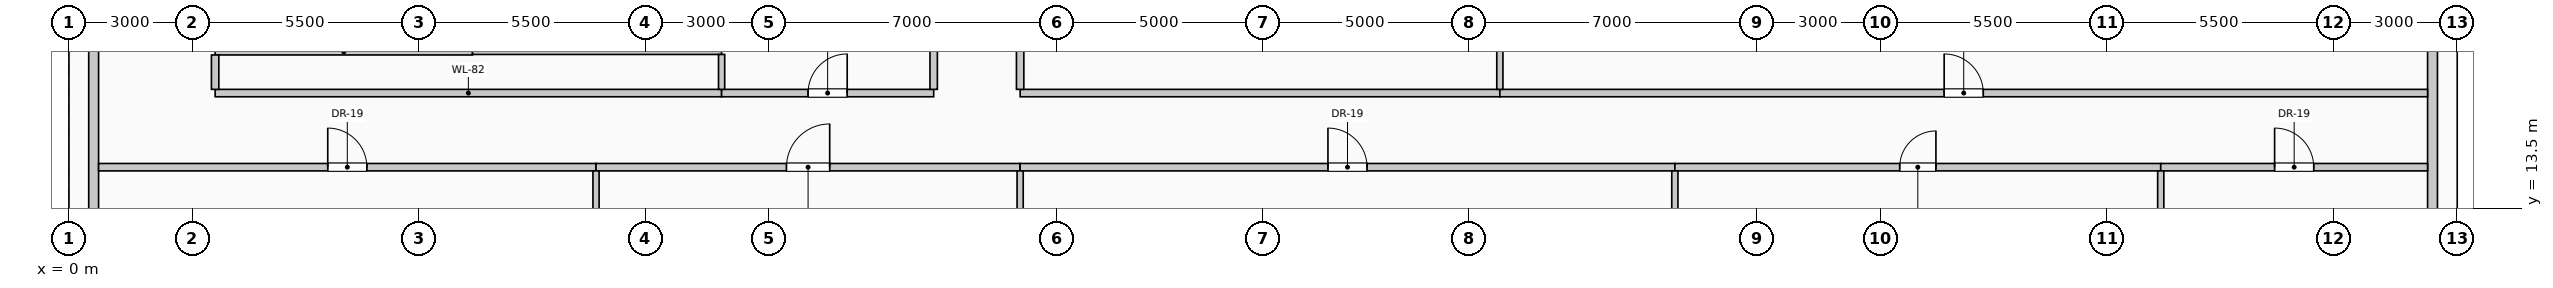
"""IFC4 building model, lengths in metres.
Left out: names, types, materials, properties, quantities, classifications, styles, units other than length and angle.
Written with IfcOpenShell. Run it as: python <this file> out.ifc"""

import sys

from ifc_helpers import new_model, si_unit, direction, frame, frame_2d, origin, place, context, subcontext, project, spatial, rectangle, extrude, element, fill, save


model = new_model("IFC4")
c1 = context("Model", 3, precision=1e-05, world=origin(), true_north=direction((0.0, 1.0)))
c2 = subcontext(c1, "Body", "Model", "MODEL_VIEW")
j1 = project(units=[si_unit("LENGTHUNIT", "METRE"), si_unit("PLANEANGLEUNIT", "RADIAN")], contexts=[c1])
p1 = place(None, origin())
s1 = spatial("IfcSite", under=j1, at=p1, CompositionType="ELEMENT")
p2 = place(p1, origin())
s2 = spatial("IfcBuilding", under=s1, at=p2, CompositionType="ELEMENT")
p3 = place(p2, frame((0.0, 0.0, 214.6)))
s3 = spatial("IfcBuildingStorey", under=s2, at=p3, CompositionType="ELEMENT", Elevation=214.6)
p4 = place(p3, frame((0.6, 10.42, 0.0), z_axis=(0.0, 0.0, 1.0), x_axis=(0.0, 1.0, 0.0)))
e1 = element("IfcWall", 1, at=p4, inside=s3, PredefinedType="SOLIDWALL", context=c2, shape_type="SweptSolid", body=[
    extrude(rectangle(XDim=7.16, YDim=0.24, at=frame_2d((3.58, 0.0))), origin(), (0.0, 0.0, 1.0), 3.0),
])
p5 = place(p4, frame((1.187, 0.0, 0.42)))
e2 = element("IfcOpeningElement", 2, at=p5, cuts=e1, PredefinedType="OPENING", context=c2, shape_type="SweptSolid", body=[
    extrude(rectangle(XDim=1.8, YDim=2.2, at=frame_2d((0.9, 1.1))), frame((0.0, 0.13, 0.0), z_axis=(0.0, -1.0, 0.0), x_axis=(1.0, 0.0, 0.0)), (0.0, 0.0, 1.0), 0.26),
])
p6 = place(p3, frame((57.4, 17.58, 0.0), z_axis=(0.0, 0.0, 1.0), x_axis=(0.0, -1.0, 0.0)))
e3 = element("IfcWall", 3, at=p6, inside=s3, PredefinedType="SOLIDWALL", context=c2, shape_type="SweptSolid", body=[
    extrude(rectangle(XDim=7.16, YDim=0.24, at=frame_2d((3.58, 0.0))), origin(), (0.0, 0.0, 1.0), 3.0),
])
p7 = place(p6, frame((4.173, 0.0, 0.42)))
e4 = element("IfcOpeningElement", 4, at=p7, cuts=e3, PredefinedType="OPENING", context=c2, shape_type="SweptSolid", body=[
    extrude(rectangle(XDim=1.8, YDim=2.2, at=frame_2d((0.9, 1.1))), frame((0.0, 0.13, 0.0), z_axis=(0.0, -1.0, 0.0), x_axis=(1.0, 0.0, 0.0)), (0.0, 0.0, 1.0), 0.26),
])
p8 = place(p3, frame((0.72, 14.5, 0.0), z_axis=(0.0, 0.0, 1.0), x_axis=(1.0, 0.0, 0.0)))
e5 = element("IfcWall", 5, at=p8, inside=s3, PredefinedType="PARTITIONING", context=c2, shape_type="SweptSolid", body=[
    extrude(rectangle(XDim=12.08, YDim=0.18, at=frame_2d((6.04, 0.0))), origin(), (0.0, 0.0, 1.0), 3.75),
])
p9 = place(p8, frame((5.565, 0.0, 0.0)))
e6 = element("IfcOpeningElement", 6, at=p9, cuts=e5, PredefinedType="OPENING", context=c2, shape_type="SweptSolid", body=[
    extrude(rectangle(XDim=0.95, YDim=2.15, at=frame_2d((0.475, 1.075))), frame((0.0, 0.1, 0.0), z_axis=(0.0, -1.0, 0.0), x_axis=(1.0, 0.0, 0.0)), (0.0, 0.0, 1.0), 0.2),
])
p10 = place(p3, frame((12.8, 14.5, 0.0), z_axis=(0.0, 0.0, 1.0), x_axis=(1.0, 0.0, 0.0)))
e7 = element("IfcWall", 7, at=p10, inside=s3, PredefinedType="PARTITIONING", context=c2, shape_type="SweptSolid", body=[
    extrude(rectangle(XDim=10.3, YDim=0.18, at=frame_2d((5.15, 0.0))), origin(), (0.0, 0.0, 1.0), 3.75),
])
p11 = place(p10, frame((4.625, 0.0, 0.0)))
e8 = element("IfcOpeningElement", 8, at=p11, cuts=e7, PredefinedType="OPENING", context=c2, shape_type="SweptSolid", body=[
    extrude(rectangle(XDim=1.05, YDim=2.15, at=frame_2d((0.525, 1.075))), frame((0.0, 0.1, 0.0), z_axis=(0.0, -1.0, 0.0), x_axis=(1.0, 0.0, 0.0)), (0.0, 0.0, 1.0), 0.2),
])
p12 = place(p3, frame((23.1, 14.5, 0.0), z_axis=(0.0, 0.0, 1.0), x_axis=(1.0, 0.0, 0.0)))
e9 = element("IfcWall", 9, at=p12, inside=s3, PredefinedType="PARTITIONING", context=c2, shape_type="SweptSolid", body=[
    extrude(rectangle(XDim=15.9, YDim=0.18, at=frame_2d((7.95, 0.0))), origin(), (0.0, 0.0, 1.0), 3.75),
])
p13 = place(p12, frame((7.475, 0.0, 0.0)))
e10 = element("IfcOpeningElement", 10, at=p13, cuts=e9, PredefinedType="OPENING", context=c2, shape_type="SweptSolid", body=[
    extrude(rectangle(XDim=0.95, YDim=2.15, at=frame_2d((0.475, 1.075))), frame((0.0, 0.1, 0.0), z_axis=(0.0, -1.0, 0.0), x_axis=(1.0, 0.0, 0.0)), (0.0, 0.0, 1.0), 0.2),
])
p14 = place(p3, frame((39.0, 14.5, 0.0), z_axis=(0.0, 0.0, 1.0), x_axis=(1.0, 0.0, 0.0)))
e11 = element("IfcWall", 11, at=p14, inside=s3, PredefinedType="PARTITIONING", context=c2, shape_type="SweptSolid", body=[
    extrude(rectangle(XDim=11.8, YDim=0.18, at=frame_2d((5.9, 0.0))), origin(), (0.0, 0.0, 1.0), 3.75),
])
p15 = place(p14, frame((5.46, 0.0, 0.0)))
e12 = element("IfcOpeningElement", 12, at=p15, cuts=e11, PredefinedType="OPENING", context=c2, shape_type="SweptSolid", body=[
    extrude(rectangle(XDim=0.88, YDim=2.1, at=frame_2d((0.44, 1.05))), frame((0.0, 0.1, 0.0), z_axis=(0.0, -1.0, 0.0), x_axis=(1.0, 0.0, 0.0)), (0.0, 0.0, 1.0), 0.2),
])
p16 = place(p3, frame((50.8, 14.5, 0.0), z_axis=(0.0, 0.0, 1.0), x_axis=(1.0, 0.0, 0.0)))
e13 = element("IfcWall", 13, at=p16, inside=s3, PredefinedType="PARTITIONING", context=c2, shape_type="SweptSolid", body=[
    extrude(rectangle(XDim=6.48, YDim=0.18, at=frame_2d((3.24, 0.0))), origin(), (0.0, 0.0, 1.0), 3.75),
])
p17 = place(p16, frame((2.765, 0.0, 0.0)))
e14 = element("IfcOpeningElement", 14, at=p17, cuts=e13, PredefinedType="OPENING", context=c2, shape_type="SweptSolid", body=[
    extrude(rectangle(XDim=0.95, YDim=2.15, at=frame_2d((0.475, 1.075))), frame((0.0, 0.1, 0.0), z_axis=(0.0, -1.0, 0.0), x_axis=(1.0, 0.0, 0.0)), (0.0, 0.0, 1.0), 0.2),
])
p18 = place(p3, frame((3.55, 16.3, 0.0), z_axis=(0.0, 0.0, 1.0), x_axis=(1.0, 0.0, 0.0)))
e15 = element("IfcWall", 15, at=p18, inside=s3, PredefinedType="PARTITIONING", context=c2, shape_type="SweptSolid", body=[
    extrude(rectangle(XDim=12.3, YDim=0.18, at=frame_2d((6.15, 0.0))), origin(), (0.0, 0.0, 1.0), 3.75),
])
p19 = place(p3, frame((15.85, 16.3, 0.0), z_axis=(0.0, 0.0, 1.0), x_axis=(1.0, 0.0, 0.0)))
e16 = element("IfcWall", 16, at=p19, inside=s3, PredefinedType="PARTITIONING", context=c2, shape_type="SweptSolid", body=[
    extrude(rectangle(XDim=5.15, YDim=0.18, at=frame_2d((2.575, 0.0))), origin(), (0.0, 0.0, 1.0), 3.75),
])
p20 = place(p19, frame((2.1, 0.0, 0.0)))
e17 = element("IfcOpeningElement", 17, at=p20, cuts=e16, PredefinedType="OPENING", context=c2, shape_type="SweptSolid", body=[
    extrude(rectangle(XDim=0.95, YDim=2.15, at=frame_2d((0.475, 1.075))), frame((0.0, 0.1, 0.0), z_axis=(0.0, -1.0, 0.0), x_axis=(1.0, 0.0, 0.0)), (0.0, 0.0, 1.0), 0.2),
])
p21 = place(p3, frame((23.1, 16.3, 0.0), z_axis=(0.0, 0.0, 1.0), x_axis=(1.0, 0.0, 0.0)))
e18 = element("IfcWall", 18, at=p21, inside=s3, PredefinedType="PARTITIONING", context=c2, shape_type="SweptSolid", body=[
    extrude(rectangle(XDim=11.65, YDim=0.18, at=frame_2d((5.825, 0.0))), origin(), (0.0, 0.0, 1.0), 3.75),
])
p22 = place(p3, frame((34.75, 16.3, 0.0), z_axis=(0.0, 0.0, 1.0), x_axis=(1.0, 0.0, 0.0)))
e19 = element("IfcWall", 19, at=p22, inside=s3, PredefinedType="PARTITIONING", context=c2, shape_type="SweptSolid", body=[
    extrude(rectangle(XDim=22.53, YDim=0.18, at=frame_2d((11.265, 0.0))), origin(), (0.0, 0.0, 1.0), 3.75),
])
p23 = place(p22, frame((10.79, 0.0, 0.0)))
e20 = element("IfcOpeningElement", 20, at=p23, cuts=e19, PredefinedType="OPENING", context=c2, shape_type="SweptSolid", body=[
    extrude(rectangle(XDim=0.95, YDim=2.15, at=frame_2d((0.475, 1.075))), frame((0.0, 0.1, 0.0), z_axis=(0.0, -1.0, 0.0), x_axis=(1.0, 0.0, 0.0)), (0.0, 0.0, 1.0), 0.2),
])
p24 = place(p3, frame((3.55, 17.3, 0.0), z_axis=(0.0, 0.0, 1.0), x_axis=(1.0, 0.0, 0.0)))
e21 = element("IfcWall", 21, at=p24, inside=s3, PredefinedType="PARTITIONING", context=c2, shape_type="SweptSolid", body=[
    extrude(rectangle(XDim=6.25, YDim=0.15, at=frame_2d((3.125, 0.0))), origin(), (0.0, 0.0, 1.0), 3.75),
])
p25 = place(p3, frame((9.8, 17.3, 0.0), z_axis=(0.0, 0.0, 1.0), x_axis=(1.0, 0.0, 0.0)))
e22 = element("IfcWall", 22, at=p25, inside=s3, PredefinedType="PARTITIONING", context=c2, shape_type="SweptSolid", body=[
    extrude(rectangle(XDim=6.05, YDim=0.125, at=frame_2d((3.025, 0.0))), origin(), (0.0, 0.0, 1.0), 3.75),
])
p26 = place(p3, frame((3.55, 16.39, 0.0), z_axis=(0.0, 0.0, 1.0), x_axis=(0.0, 1.0, 0.0)))
e23 = element("IfcWall", 23, at=p26, inside=s3, PredefinedType="PARTITIONING", context=c2, shape_type="SweptSolid", body=[
    extrude(rectangle(XDim=0.835, YDim=0.18, at=frame_2d((0.417, 0.0))), origin(), (0.0, 0.0, 1.0), 3.75),
])
p27 = place(p3, frame((12.8, 0.72, 0.0), z_axis=(0.0, 0.0, 1.0), x_axis=(0.0, 1.0, 0.0)))
e24 = element("IfcWall", 24, at=p27, inside=s3, PredefinedType="PARTITIONING", context=c2, shape_type="SweptSolid", body=[
    extrude(rectangle(XDim=13.69, YDim=0.15, at=frame_2d((6.845, 0.0))), origin(), (0.0, 0.0, 1.0), 3.75),
])
p28 = place(p3, frame((15.85, 16.39, 0.0), z_axis=(0.0, 0.0, 1.0), x_axis=(0.0, 1.0, 0.0)))
e25 = element("IfcWall", 25, at=p28, inside=s3, PredefinedType="PARTITIONING", context=c2, shape_type="SweptSolid", body=[
    extrude(rectangle(XDim=0.848, YDim=0.15, at=frame_2d((0.424, 0.0))), origin(), (0.0, 0.0, 1.0), 3.75),
])
p29 = place(p3, frame((21.0, 16.39, 0.0), z_axis=(0.0, 0.0, 1.0), x_axis=(0.0, 1.0, 0.0)))
e26 = element("IfcWall", 26, at=p29, inside=s3, PredefinedType="PARTITIONING", context=c2, shape_type="SweptSolid", body=[
    extrude(rectangle(XDim=8.335, YDim=0.18, at=frame_2d((4.167, 0.0))), origin(), (0.0, 0.0, 1.0), 3.75),
])
p30 = place(p3, frame((23.1, 0.72, 0.0), z_axis=(0.0, 0.0, 1.0), x_axis=(0.0, 1.0, 0.0)))
e27 = element("IfcWall", 27, at=p30, inside=s3, PredefinedType="PARTITIONING", context=c2, shape_type="SweptSolid", body=[
    extrude(rectangle(XDim=13.69, YDim=0.15, at=frame_2d((6.845, 0.0))), origin(), (0.0, 0.0, 1.0), 3.75),
])
p31 = place(p3, frame((23.1, 16.39, 0.0), z_axis=(0.0, 0.0, 1.0), x_axis=(0.0, 1.0, 0.0)))
e28 = element("IfcWall", 28, at=p31, inside=s3, PredefinedType="PARTITIONING", context=c2, shape_type="SweptSolid", body=[
    extrude(rectangle(XDim=3.185, YDim=0.18, at=frame_2d((1.593, 0.0))), origin(), (0.0, 0.0, 1.0), 3.75),
])
p32 = place(p3, frame((34.75, 16.39, 0.0), z_axis=(0.0, 0.0, 1.0), x_axis=(0.0, 1.0, 0.0)))
e29 = element("IfcWall", 29, at=p32, inside=s3, PredefinedType="PARTITIONING", context=c2, shape_type="SweptSolid", body=[
    extrude(rectangle(XDim=3.185, YDim=0.15, at=frame_2d((1.593, 0.0))), origin(), (0.0, 0.0, 1.0), 3.75),
])
for number, where, z_axis, x_axis in (
    (30, (39.0, 0.72, 0.0), (0.0, 0.0, 1.0), (0.0, 1.0, 0.0)),
    (31, (50.8, 0.72, 0.0), (0.0, 0.0, 1.0), (0.0, 1.0, 0.0)),
):
    element("IfcWall", number, at=place(p3, frame(where, z_axis=z_axis, x_axis=x_axis)), inside=s3, PredefinedType="PARTITIONING", context=c2, shape_type="SweptSolid", body=[
        extrude(rectangle(XDim=13.69, YDim=0.15, at=frame_2d((6.845, 0.0))), origin(), (0.0, 0.0, 1.0), 3.75),
    ])
p33 = place(p9, origin())
e32 = element("IfcDoor", 32, at=p33, inside=s3, OperationType="SINGLE_SWING_LEFT", PredefinedType="DOOR", context=c2, shape_type="SweptSolid", body=[
    extrude(rectangle(XDim=0.95, YDim=2.15, at=frame_2d((0.475, 1.075))), frame((0.0, 0.025, 0.0), z_axis=(0.0, -1.0, 0.0), x_axis=(1.0, 0.0, 0.0)), (0.0, 0.0, 1.0), 0.05),
])
fill(e6, e32)
p34 = place(p11, origin())
e33 = element("IfcDoor", 33, at=p34, inside=s3, OperationType="SINGLE_SWING_RIGHT", PredefinedType="DOOR", context=c2, shape_type="SweptSolid", body=[
    extrude(rectangle(XDim=1.05, YDim=2.15, at=frame_2d((0.525, 1.075))), frame((0.0, 0.025, 0.0), z_axis=(0.0, -1.0, 0.0), x_axis=(1.0, 0.0, 0.0)), (0.0, 0.0, 1.0), 0.05),
])
fill(e8, e33)
p35 = place(p13, origin())
e34 = element("IfcDoor", 34, at=p35, inside=s3, OperationType="SINGLE_SWING_LEFT", PredefinedType="DOOR", context=c2, shape_type="SweptSolid", body=[
    extrude(rectangle(XDim=0.95, YDim=2.15, at=frame_2d((0.475, 1.075))), frame((0.0, 0.025, 0.0), z_axis=(0.0, -1.0, 0.0), x_axis=(1.0, 0.0, 0.0)), (0.0, 0.0, 1.0), 0.05),
])
fill(e10, e34)
p36 = place(p15, origin())
e35 = element("IfcDoor", 35, at=p36, inside=s3, OperationType="SINGLE_SWING_RIGHT", PredefinedType="DOOR", context=c2, shape_type="SweptSolid", body=[
    extrude(rectangle(XDim=0.88, YDim=2.1, at=frame_2d((0.44, 1.05))), frame((0.0, 0.025, 0.0), z_axis=(0.0, -1.0, 0.0), x_axis=(1.0, 0.0, 0.0)), (0.0, 0.0, 1.0), 0.05),
])
fill(e12, e35)
p37 = place(p17, origin())
e36 = element("IfcDoor", 36, at=p37, inside=s3, OperationType="SINGLE_SWING_LEFT", PredefinedType="DOOR", context=c2, shape_type="SweptSolid", body=[
    extrude(rectangle(XDim=0.95, YDim=2.15, at=frame_2d((0.475, 1.075))), frame((0.0, 0.025, 0.0), z_axis=(0.0, -1.0, 0.0), x_axis=(1.0, 0.0, 0.0)), (0.0, 0.0, 1.0), 0.05),
])
fill(e14, e36)
p38 = place(p20, origin())
e37 = element("IfcDoor", 37, at=p38, inside=s3, OperationType="SINGLE_SWING_RIGHT", PredefinedType="DOOR", context=c2, shape_type="SweptSolid", body=[
    extrude(rectangle(XDim=0.95, YDim=2.15, at=frame_2d((0.475, 1.075))), frame((0.0, 0.025, 0.0), z_axis=(0.0, -1.0, 0.0), x_axis=(1.0, 0.0, 0.0)), (0.0, 0.0, 1.0), 0.05),
])
fill(e17, e37)
p39 = place(p23, origin())
e38 = element("IfcDoor", 38, at=p39, inside=s3, OperationType="SINGLE_SWING_LEFT", PredefinedType="DOOR", context=c2, shape_type="SweptSolid", body=[
    extrude(rectangle(XDim=0.95, YDim=2.15, at=frame_2d((0.475, 1.075))), frame((0.0, 0.025, 0.0), z_axis=(0.0, -1.0, 0.0), x_axis=(1.0, 0.0, 0.0)), (0.0, 0.0, 1.0), 0.05),
])
fill(e20, e38)
save(model, sys.argv[1])
